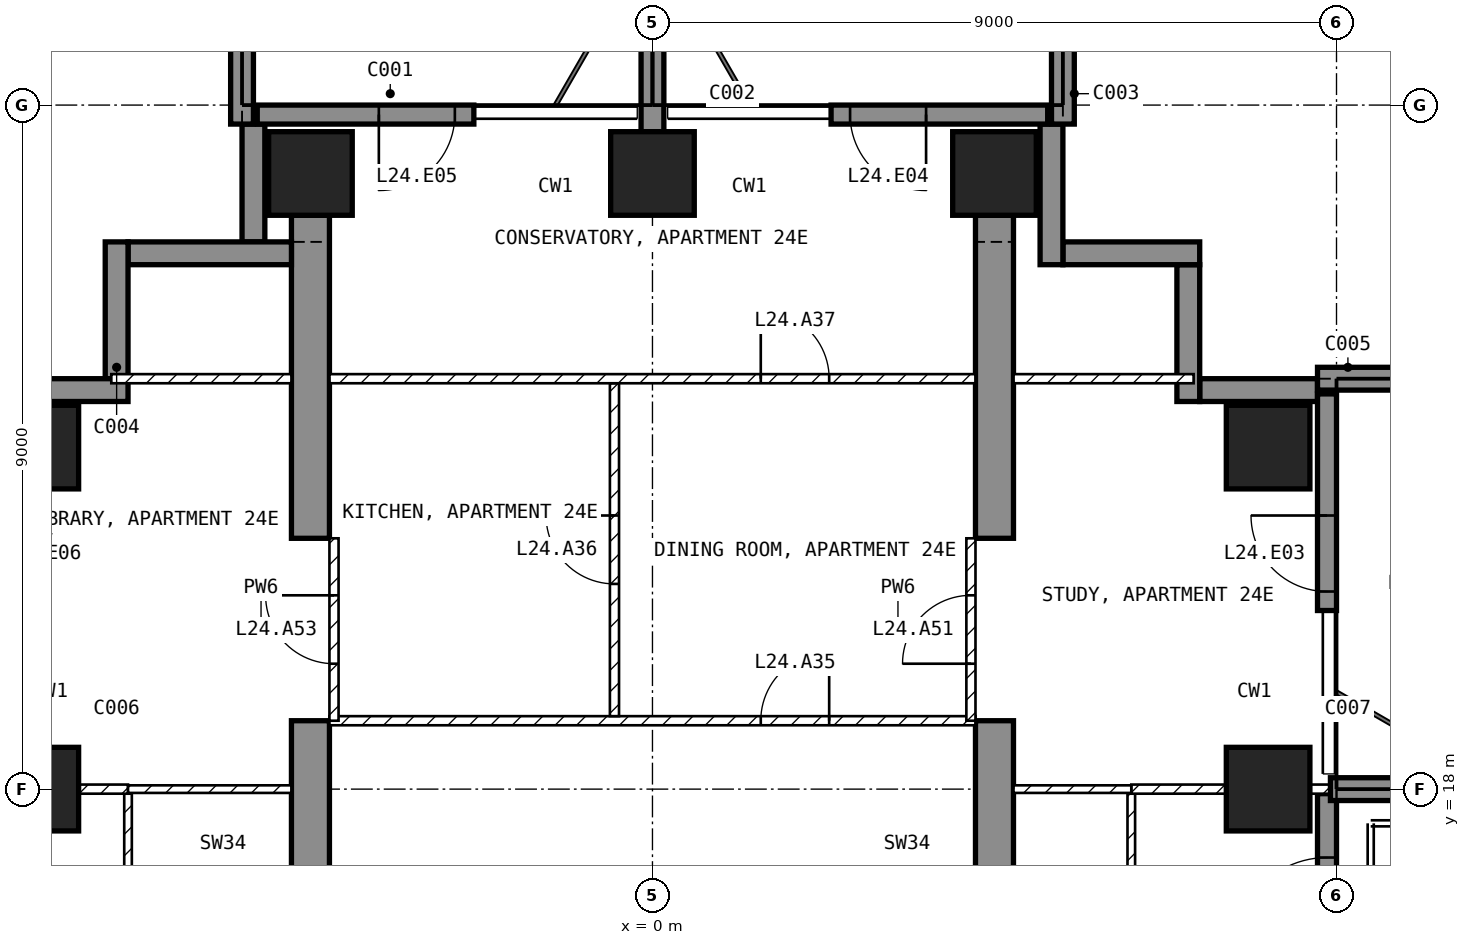
"""IFC4 building model, lengths in metres.
Left out: names, types, materials, properties, quantities, classifications, styles, units other than length and angle.
Written with IfcOpenShell. Run it as: python <this file> out.ifc"""

import sys

from ifc_helpers import new_model, si_unit, direction, frame, frame_2d, origin, origin_2d, place, context, subcontext, project, spatial, polyline, rectangle, outline, extrude, element, fill, save


model = new_model("IFC4")
c1 = context("Model", 3, precision=1e-05, world=origin(), true_north=direction((0.0, 1.0)))
c2 = subcontext(c1, "Body", "Model", "MODEL_VIEW")
j1 = project(units=[si_unit("LENGTHUNIT", "METRE"), si_unit("PLANEANGLEUNIT", "RADIAN")], contexts=[c1])
p1 = place(None, origin())
s1 = spatial("IfcSite", under=j1, at=p1, CompositionType="ELEMENT")
p2 = place(p1, origin())
s2 = spatial("IfcBuilding", under=s1, at=p2, CompositionType="ELEMENT")
p3 = place(p2, frame((0.0, 0.0, 105.9)))
s3 = spatial("IfcBuildingStorey", under=s2, at=p3, CompositionType="ELEMENT", Elevation=105.9)
for number, where, z_axis, x_axis in (
    (1, (-8.1, 18.0, -0.25), (0.0, 0.0, 1.0), (1.0, 0.0, 0.0)),
    (2, (-8.1, 22.5, -0.25), (0.0, 0.0, 1.0), (1.0, 0.0, 0.0)),
    (3, (-4.5, 26.1, -0.25), (0.0, 0.0, 1.0), (1.0, 0.0, 0.0)),
    (4, (0.0, 26.1, -0.25), (0.0, 0.0, 1.0), (1.0, 0.0, 0.0)),
    (5, (4.5, 26.1, -0.25), (0.0, 0.0, 1.0), (1.0, 0.0, 0.0)),
    (6, (8.1, 18.0, -0.25), (0.0, 0.0, 1.0), (1.0, 0.0, 0.0)),
    (7, (8.1, 22.5, -0.25), (0.0, 0.0, 1.0), (1.0, 0.0, 0.0)),
):
    element("IfcColumn", number, at=place(p3, frame(where, z_axis=z_axis, x_axis=x_axis)), inside=s3, PredefinedType="COLUMN", context=c2, shape_type="SweptSolid", body=[
        extrude(rectangle(XDim=1.1, YDim=1.1, at=origin_2d()), origin(), (0.0, 0.0, 1.0), 3.5),
    ])
for number, where, z_axis, x_axis in (
    (8, (-4.75, 9.0, -0.25), (1.0, 0.0, 0.0), (0.0, 1.0, 0.0)),
    (9, (4.25, 9.0, -0.25), (1.0, 0.0, 0.0), (0.0, 1.0, 0.0)),
):
    element("IfcWall", number, at=place(p3, frame(where, z_axis=z_axis, x_axis=x_axis)), inside=s3, PredefinedType="SHEAR", context=c2, shape_type="SweptSolid", body=[
        extrude(outline(polyline([(0.0, 0.0), (2.1, 0.0), (2.1, 2.65), (4.5, 2.65), (4.5, 0.0), (9.9, 0.0), (9.9, 2.65), (12.3, 2.65), (12.3, 0.0), (16.55, 0.0), (16.55, 3.5), (0.0, 3.5), (0.0, 0.0)])), origin(), (0.0, 0.0, 1.0), 0.5),
    ])
p4 = place(p3, frame((8.875, 15.65, 0.0), z_axis=(0.0, 0.0, 1.0), x_axis=(0.0, 1.0, 0.0)))
e10 = element("IfcWall", 10, at=p4, inside=s3, PredefinedType="SOLIDWALL", context=c2, shape_type="SweptSolid", body=[
    extrude(rectangle(XDim=2.29, YDim=0.25, at=frame_2d((1.145, 0.0))), origin(), (0.0, 0.0, 1.0), 3.25),
])
p5 = place(p4, frame((0.25, 0.0, 0.0)))
e11 = element("IfcOpeningElement", 11, at=p5, cuts=e10, PredefinedType="OPENING", context=c2, shape_type="SweptSolid", body=[
    extrude(rectangle(XDim=1.2, YDim=2.4, at=frame_2d((0.6, 1.2))), frame((0.0, 0.135, 0.0), z_axis=(0.0, -1.0, 0.0), x_axis=(1.0, 0.0, 0.0)), (0.0, 0.0, 1.0), 0.27),
])
p6 = place(p3, frame((8.875, 20.35, 0.0), z_axis=(0.0, 0.0, 1.0), x_axis=(0.0, 1.0, 0.0)))
e12 = element("IfcWall", 12, at=p6, inside=s3, PredefinedType="SOLIDWALL", context=c2, shape_type="SweptSolid", body=[
    extrude(rectangle(XDim=2.85, YDim=0.25, at=frame_2d((1.425, 0.0))), origin(), (0.0, 0.0, 1.0), 3.25),
])
p7 = place(p6, frame((0.25, 0.0, 0.0)))
e13 = element("IfcOpeningElement", 13, at=p7, cuts=e12, PredefinedType="OPENING", context=c2, shape_type="SweptSolid", body=[
    extrude(rectangle(XDim=1.0, YDim=2.4, at=frame_2d((0.5, 1.2))), frame((0.0, 0.135, 0.0), z_axis=(0.0, -1.0, 0.0), x_axis=(1.0, 0.0, 0.0)), (0.0, 0.0, 1.0), 0.27),
])
p8 = place(p3, frame((5.2, 26.875, 0.0), z_axis=(0.0, 0.0, 1.0), x_axis=(-1.0, 0.0, 0.0)))
e14 = element("IfcWall", 14, at=p8, inside=s3, PredefinedType="SOLIDWALL", context=c2, shape_type="SweptSolid", body=[
    extrude(rectangle(XDim=2.85, YDim=0.25, at=frame_2d((1.425, 0.0))), origin(), (0.0, 0.0, 1.0), 3.25),
])
p9 = place(p8, frame((1.6, 0.0, 0.0)))
e15 = element("IfcOpeningElement", 15, at=p9, cuts=e14, PredefinedType="OPENING", context=c2, shape_type="SweptSolid", body=[
    extrude(rectangle(XDim=1.0, YDim=2.4, at=frame_2d((0.5, 1.2))), frame((0.0, 0.135, 0.0), z_axis=(0.0, -1.0, 0.0), x_axis=(1.0, 0.0, 0.0)), (0.0, 0.0, 1.0), 0.27),
])
p10 = place(p3, frame((-2.35, 26.875, 0.0), z_axis=(0.0, 0.0, 1.0), x_axis=(-1.0, 0.0, 0.0)))
e16 = element("IfcWall", 16, at=p10, inside=s3, PredefinedType="SOLIDWALL", context=c2, shape_type="SweptSolid", body=[
    extrude(rectangle(XDim=2.85, YDim=0.25, at=frame_2d((1.425, 0.0))), origin(), (0.0, 0.0, 1.0), 3.25),
])
p11 = place(p10, frame((0.25, 0.0, 0.0)))
e17 = element("IfcOpeningElement", 17, at=p11, cuts=e16, PredefinedType="OPENING", context=c2, shape_type="SweptSolid", body=[
    extrude(rectangle(XDim=1.0, YDim=2.4, at=frame_2d((0.5, 1.2))), frame((0.0, 0.135, 0.0), z_axis=(0.0, -1.0, 0.0), x_axis=(1.0, 0.0, 0.0)), (0.0, 0.0, 1.0), 0.27),
])
p12 = place(p3, frame((8.75, 23.25, 0.0), z_axis=(0.0, 0.0, 1.0), x_axis=(-1.0, 0.0, 0.0)))
e18 = element("IfcWall", 18, at=p12, inside=s3, PredefinedType="SOLIDWALL", context=c2, shape_type="SweptSolid", body=[
    extrude(rectangle(XDim=1.55, YDim=0.3, at=frame_2d((0.775, 0.0))), origin(), (0.0, 0.0, 1.0), 3.25),
])
p13 = place(p3, frame((7.05, 23.1, 0.0), z_axis=(0.0, 0.0, 1.0), x_axis=(0.0, 1.0, 0.0)))
e19 = element("IfcWall", 19, at=p13, inside=s3, PredefinedType="SOLIDWALL", context=c2, shape_type="SweptSolid", body=[
    extrude(rectangle(XDim=1.8, YDim=0.3, at=frame_2d((0.9, 0.0))), origin(), (0.0, 0.0, 1.0), 3.25),
])
p14 = place(p3, frame((7.2, 25.05, 0.0), z_axis=(0.0, 0.0, 1.0), x_axis=(-1.0, 0.0, 0.0)))
e20 = element("IfcWall", 20, at=p14, inside=s3, PredefinedType="SOLIDWALL", context=c2, shape_type="SweptSolid", body=[
    extrude(rectangle(XDim=1.8, YDim=0.3, at=frame_2d((0.9, 0.0))), origin(), (0.0, 0.0, 1.0), 3.25),
])
p15 = place(p3, frame((5.25, 24.9, 0.0), z_axis=(0.0, 0.0, 1.0), x_axis=(0.0, 1.0, 0.0)))
e21 = element("IfcWall", 21, at=p15, inside=s3, PredefinedType="SOLIDWALL", context=c2, shape_type="SweptSolid", body=[
    extrude(rectangle(XDim=1.85, YDim=0.3, at=frame_2d((0.925, 0.0))), origin(), (0.0, 0.0, 1.0), 3.25),
])
p16 = place(p3, frame((-5.25, 26.75, 0.0), z_axis=(0.0, 0.0, 1.0), x_axis=(0.0, -1.0, 0.0)))
e22 = element("IfcWall", 22, at=p16, inside=s3, PredefinedType="SOLIDWALL", context=c2, shape_type="SweptSolid", body=[
    extrude(rectangle(XDim=1.55, YDim=0.3, at=frame_2d((0.775, 0.0))), origin(), (0.0, 0.0, 1.0), 3.25),
])
p17 = place(p3, frame((-4.75, 25.05, 0.0), z_axis=(0.0, 0.0, 1.0), x_axis=(-1.0, 0.0, 0.0)))
e23 = element("IfcWall", 23, at=p17, inside=s3, PredefinedType="SOLIDWALL", context=c2, shape_type="SweptSolid", body=[
    extrude(rectangle(XDim=2.15, YDim=0.3, at=frame_2d((1.075, 0.0))), origin(), (0.0, 0.0, 1.0), 3.25),
])
p18 = place(p3, frame((-7.05, 25.2, 0.0), z_axis=(0.0, 0.0, 1.0), x_axis=(0.0, -1.0, 0.0)))
e24 = element("IfcWall", 24, at=p18, inside=s3, PredefinedType="SOLIDWALL", context=c2, shape_type="SweptSolid", body=[
    extrude(rectangle(XDim=1.8, YDim=0.3, at=frame_2d((0.9, 0.0))), origin(), (0.0, 0.0, 1.0), 3.25),
])
p19 = place(p3, frame((-6.9, 23.25, 0.0), z_axis=(0.0, 0.0, 1.0), x_axis=(-1.0, 0.0, 0.0)))
e25 = element("IfcWall", 25, at=p19, inside=s3, PredefinedType="SOLIDWALL", context=c2, shape_type="SweptSolid", body=[
    extrude(rectangle(XDim=1.85, YDim=0.3, at=frame_2d((0.925, 0.0))), origin(), (0.0, 0.0, 1.0), 3.25),
])
p20 = place(p3, frame((-5.4, 26.75, 0.0), z_axis=(0.0, 0.0, 1.0), x_axis=(0.0, 1.0, 0.0)))
e26 = element("IfcWall", 26, at=p20, inside=s3, PredefinedType="SOLIDWALL", context=c2, shape_type="SweptSolid", body=[
    extrude(rectangle(XDim=2.95, YDim=0.3, at=frame_2d((1.475, 0.0))), origin(), (0.0, 0.0, 1.0), 3.25),
])
p21 = place(p3, frame((0.0, 26.65, 0.0), z_axis=(0.0, 0.0, 1.0), x_axis=(0.0, 1.0, 0.0)))
e27 = element("IfcWall", 27, at=p21, inside=s3, PredefinedType="SOLIDWALL", context=c2, shape_type="SweptSolid", body=[
    extrude(rectangle(XDim=3.05, YDim=0.3, at=frame_2d((1.525, 0.0))), origin(), (0.0, 0.0, 1.0), 3.25),
])
p22 = place(p3, frame((5.4, 26.75, 0.0), z_axis=(0.0, 0.0, 1.0), x_axis=(0.0, 1.0, 0.0)))
e28 = element("IfcWall", 28, at=p22, inside=s3, PredefinedType="SOLIDWALL", context=c2, shape_type="SweptSolid", body=[
    extrude(rectangle(XDim=2.95, YDim=0.3, at=frame_2d((1.475, 0.0))), origin(), (0.0, 0.0, 1.0), 3.25),
])
p23 = place(p3, frame((8.92, 18.0, 0.0), z_axis=(0.0, 0.0, 1.0), x_axis=(1.0, 0.0, 0.0)))
e29 = element("IfcWall", 29, at=p23, inside=s3, PredefinedType="SOLIDWALL", context=c2, shape_type="SweptSolid", body=[
    extrude(rectangle(XDim=2.82, YDim=0.3, at=frame_2d((1.41, 0.0))), origin(), (0.0, 0.0, 1.0), 3.25),
])
p24 = place(p3, frame((8.75, 23.4, 0.0), z_axis=(0.0, 0.0, 1.0), x_axis=(1.0, 0.0, 0.0)))
e30 = element("IfcWall", 30, at=p24, inside=s3, PredefinedType="SOLIDWALL", context=c2, shape_type="SweptSolid", body=[
    extrude(rectangle(XDim=2.95, YDim=0.3, at=frame_2d((1.475, 0.0))), origin(), (0.0, 0.0, 1.0), 3.25),
])
p25 = place(p3, frame((-4.25, 18.9, 0.0), z_axis=(0.0, 0.0, 1.0), x_axis=(1.0, 0.0, 0.0)))
e31 = element("IfcWall", 31, at=p25, inside=s3, PredefinedType="PARTITIONING", context=c2, shape_type="SweptSolid", body=[
    extrude(rectangle(XDim=8.5, YDim=0.12, at=frame_2d((4.25, 0.0))), origin(), (0.0, 0.0, 1.0), 3.25),
])
p26 = place(p25, frame((5.675, 0.0, 0.0)))
e32 = element("IfcOpeningElement", 32, at=p26, cuts=e31, PredefinedType="OPENING", context=c2, shape_type="SweptSolid", body=[
    extrude(rectangle(XDim=0.9, YDim=2.1, at=frame_2d((0.45, 1.05))), frame((0.0, 0.07, 0.0), z_axis=(0.0, -1.0, 0.0), x_axis=(1.0, 0.0, 0.0)), (0.0, 0.0, 1.0), 0.14),
])
p27 = place(p3, frame((-0.5, 18.96, 0.0), z_axis=(0.0, 0.0, 1.0), x_axis=(0.0, 1.0, 0.0)))
e33 = element("IfcWall", 33, at=p27, inside=s3, PredefinedType="PARTITIONING", context=c2, shape_type="SweptSolid", body=[
    extrude(rectangle(XDim=4.38, YDim=0.12, at=frame_2d((2.19, 0.0))), origin(), (0.0, 0.0, 1.0), 3.25),
])
p28 = place(p27, frame((1.74, 0.0, 0.0)))
e34 = element("IfcOpeningElement", 34, at=p28, cuts=e33, PredefinedType="OPENING", context=c2, shape_type="SweptSolid", body=[
    extrude(rectangle(XDim=0.9, YDim=2.1, at=frame_2d((0.45, 1.05))), frame((0.0, 0.07, 0.0), z_axis=(0.0, -1.0, 0.0), x_axis=(1.0, 0.0, 0.0)), (0.0, 0.0, 1.0), 0.14),
])
p29 = place(p3, frame((-4.25, 23.4, 0.0), z_axis=(0.0, 0.0, 1.0), x_axis=(1.0, 0.0, 0.0)))
e35 = element("IfcWall", 35, at=p29, inside=s3, PredefinedType="PARTITIONING", context=c2, shape_type="SweptSolid", body=[
    extrude(rectangle(XDim=8.5, YDim=0.12, at=frame_2d((4.25, 0.0))), origin(), (0.0, 0.0, 1.0), 3.25),
])
p30 = place(p29, frame((5.675, 0.0, 0.0)))
e36 = element("IfcOpeningElement", 36, at=p30, cuts=e35, PredefinedType="OPENING", context=c2, shape_type="SweptSolid", body=[
    extrude(rectangle(XDim=0.9, YDim=2.1, at=frame_2d((0.45, 1.05))), frame((0.0, 0.07, 0.0), z_axis=(0.0, -1.0, 0.0), x_axis=(1.0, 0.0, 0.0)), (0.0, 0.0, 1.0), 0.14),
])
p31 = place(p3, frame((6.3, 14.45, 0.0), z_axis=(0.0, 0.0, 1.0), x_axis=(0.0, 1.0, 0.0)))
e37 = element("IfcWall", 37, at=p31, inside=s3, PredefinedType="PARTITIONING", context=c2, shape_type="SweptSolid", body=[
    extrude(rectangle(XDim=3.49, YDim=0.1, at=frame_2d((1.745, 0.0))), origin(), (0.0, 0.0, 1.0), 3.25),
])
p32 = place(p3, frame((6.3, 18.0, 0.0), z_axis=(0.0, 0.0, 1.0), x_axis=(1.0, 0.0, 0.0)))
e38 = element("IfcWall", 38, at=p32, inside=s3, PredefinedType="PARTITIONING", context=c2, shape_type="SweptSolid", body=[
    extrude(rectangle(XDim=2.62, YDim=0.12, at=frame_2d((1.31, 0.0))), origin(), (0.0, 0.0, 1.0), 2.414),
])
p33 = place(p3, frame((4.75, 18.0, 0.0), z_axis=(0.0, 0.0, 1.0), x_axis=(1.0, 0.0, 0.0)))
e39 = element("IfcWall", 39, at=p33, inside=s3, PredefinedType="PARTITIONING", context=c2, shape_type="SweptSolid", body=[
    extrude(rectangle(XDim=1.55, YDim=0.1, at=frame_2d((0.775, 0.0))), origin(), (0.0, 0.0, 1.0), 2.414),
])
p34 = place(p3, frame((4.75, 23.4, 0.0), z_axis=(0.0, 0.0, 1.0), x_axis=(1.0, 0.0, 0.0)))
e40 = element("IfcWall", 40, at=p34, inside=s3, PredefinedType="PARTITIONING", context=c2, shape_type="SweptSolid", body=[
    extrude(rectangle(XDim=2.37, YDim=0.12, at=frame_2d((1.185, 0.0))), origin(), (0.0, 0.0, 1.0), 3.25),
])
p35 = place(p3, frame((-6.9, 17.94, 0.0), z_axis=(0.0, 0.0, 1.0), x_axis=(0.0, -1.0, 0.0)))
e41 = element("IfcWall", 41, at=p35, inside=s3, PredefinedType="PARTITIONING", context=c2, shape_type="SweptSolid", body=[
    extrude(rectangle(XDim=3.49, YDim=0.1, at=frame_2d((1.745, 0.0))), origin(), (0.0, 0.0, 1.0), 3.25),
])
p36 = place(p35, frame((1.52, 0.0, 0.0)))
e42 = element("IfcOpeningElement", 42, at=p36, cuts=e41, PredefinedType="OPENING", context=c2, shape_type="SweptSolid", body=[
    extrude(rectangle(XDim=0.85, YDim=2.1, at=frame_2d((0.425, 1.05))), frame((0.0, 0.06, 0.0), z_axis=(0.0, -1.0, 0.0), x_axis=(1.0, 0.0, 0.0)), (0.0, 0.0, 1.0), 0.12),
])
p37 = place(p3, frame((-8.92, 18.0, 0.0), z_axis=(0.0, 0.0, 1.0), x_axis=(1.0, 0.0, 0.0)))
e43 = element("IfcWall", 43, at=p37, inside=s3, PredefinedType="PARTITIONING", context=c2, shape_type="SweptSolid", body=[
    extrude(rectangle(XDim=2.02, YDim=0.12, at=frame_2d((1.01, 0.0))), origin(), (0.0, 0.0, 1.0), 2.414),
])
p38 = place(p3, frame((-6.9, 18.0, 0.0), z_axis=(0.0, 0.0, 1.0), x_axis=(1.0, 0.0, 0.0)))
e44 = element("IfcWall", 44, at=p38, inside=s3, PredefinedType="PARTITIONING", context=c2, shape_type="SweptSolid", body=[
    extrude(rectangle(XDim=2.15, YDim=0.1, at=frame_2d((1.075, 0.0))), origin(), (0.0, 0.0, 1.0), 2.414),
])
p39 = place(p3, frame((-7.12, 23.4, 0.0), z_axis=(0.0, 0.0, 1.0), x_axis=(1.0, 0.0, 0.0)))
e45 = element("IfcWall", 45, at=p39, inside=s3, PredefinedType="PARTITIONING", context=c2, shape_type="SweptSolid", body=[
    extrude(rectangle(XDim=2.37, YDim=0.12, at=frame_2d((1.185, 0.0))), origin(), (0.0, 0.0, 1.0), 3.25),
])
p40 = place(p3, frame((4.19, 18.9, 0.0), z_axis=(0.0, 0.0, 1.0), x_axis=(0.0, 1.0, 0.0)))
e46 = element("IfcWall", 46, at=p40, inside=s3, PredefinedType="PARTITIONING", context=c2, shape_type="SweptSolid", body=[
    extrude(rectangle(XDim=2.4, YDim=0.12, at=frame_2d((1.2, 0.0))), origin(), (0.0, 0.0, 1.0), 2.4),
])
p41 = place(p40, frame((0.75, 0.0, 0.0)))
e47 = element("IfcOpeningElement", 47, at=p41, cuts=e46, PredefinedType="OPENING", context=c2, shape_type="SweptSolid", body=[
    extrude(rectangle(XDim=0.9, YDim=2.1, at=frame_2d((0.45, 1.05))), frame((0.0, 0.07, 0.0), z_axis=(0.0, -1.0, 0.0), x_axis=(1.0, 0.0, 0.0)), (0.0, 0.0, 1.0), 0.14),
])
p42 = place(p3, frame((-4.19, 18.9, 0.0), z_axis=(0.0, 0.0, 1.0), x_axis=(0.0, 1.0, 0.0)))
e48 = element("IfcWall", 48, at=p42, inside=s3, PredefinedType="PARTITIONING", context=c2, shape_type="SweptSolid", body=[
    extrude(rectangle(XDim=2.4, YDim=0.12, at=frame_2d((1.2, 0.0))), origin(), (0.0, 0.0, 1.0), 2.4),
])
p43 = place(p42, frame((0.75, 0.0, 0.0)))
e49 = element("IfcOpeningElement", 49, at=p43, cuts=e48, PredefinedType="OPENING", context=c2, shape_type="SweptSolid", body=[
    extrude(rectangle(XDim=0.9, YDim=2.1, at=frame_2d((0.45, 1.05))), frame((0.0, 0.07, 0.0), z_axis=(0.0, -1.0, 0.0), x_axis=(1.0, 0.0, 0.0)), (0.0, 0.0, 1.0), 0.14),
])
p44 = place(p5, origin())
e50 = element("IfcDoor", 50, at=p44, inside=s3, OperationType="SINGLE_SWING_LEFT", PredefinedType="DOOR", context=c2, shape_type="SweptSolid", body=[
    extrude(rectangle(XDim=1.2, YDim=2.4, at=frame_2d((0.6, 1.2))), frame((0.0, 0.025, 0.0), z_axis=(0.0, -1.0, 0.0), x_axis=(1.0, 0.0, 0.0)), (0.0, 0.0, 1.0), 0.05),
])
fill(e11, e50)
p45 = place(p7, origin())
e51 = element("IfcDoor", 51, at=p45, inside=s3, OperationType="SINGLE_SWING_RIGHT", PredefinedType="DOOR", context=c2, shape_type="SweptSolid", body=[
    extrude(rectangle(XDim=1.0, YDim=2.4, at=frame_2d((0.5, 1.2))), frame((0.0, 0.025, 0.0), z_axis=(0.0, -1.0, 0.0), x_axis=(1.0, 0.0, 0.0)), (0.0, 0.0, 1.0), 0.05),
])
fill(e13, e51)
p46 = place(p9, origin())
e52 = element("IfcDoor", 52, at=p46, inside=s3, OperationType="SINGLE_SWING_LEFT", PredefinedType="DOOR", context=c2, shape_type="SweptSolid", body=[
    extrude(rectangle(XDim=1.0, YDim=2.4, at=frame_2d((0.5, 1.2))), frame((0.0, 0.025, 0.0), z_axis=(0.0, -1.0, 0.0), x_axis=(1.0, 0.0, 0.0)), (0.0, 0.0, 1.0), 0.05),
])
fill(e15, e52)
p47 = place(p11, origin())
e53 = element("IfcDoor", 53, at=p47, inside=s3, OperationType="SINGLE_SWING_RIGHT", PredefinedType="DOOR", context=c2, shape_type="SweptSolid", body=[
    extrude(rectangle(XDim=1.0, YDim=2.4, at=frame_2d((0.5, 1.2))), frame((0.0, 0.025, 0.0), z_axis=(0.0, -1.0, 0.0), x_axis=(1.0, 0.0, 0.0)), (0.0, 0.0, 1.0), 0.05),
])
fill(e17, e53)
p48 = place(p26, origin())
e54 = element("IfcDoor", 54, at=p48, inside=s3, OperationType="SINGLE_SWING_RIGHT", PredefinedType="DOOR", context=c2, shape_type="SweptSolid", body=[
    extrude(rectangle(XDim=0.9, YDim=2.1, at=frame_2d((0.45, 1.05))), frame((0.0, 0.025, 0.0), z_axis=(0.0, -1.0, 0.0), x_axis=(1.0, 0.0, 0.0)), (0.0, 0.0, 1.0), 0.05),
])
fill(e32, e54)
p49 = place(p28, origin())
e55 = element("IfcDoor", 55, at=p49, inside=s3, OperationType="SINGLE_SWING_RIGHT", PredefinedType="DOOR", context=c2, shape_type="SweptSolid", body=[
    extrude(rectangle(XDim=0.9, YDim=2.1, at=frame_2d((0.45, 1.05))), frame((0.0, 0.025, 0.0), z_axis=(0.0, -1.0, 0.0), x_axis=(1.0, 0.0, 0.0)), (0.0, 0.0, 1.0), 0.05),
])
fill(e34, e55)
p50 = place(p30, origin())
e56 = element("IfcDoor", 56, at=p50, inside=s3, OperationType="SINGLE_SWING_LEFT", PredefinedType="DOOR", context=c2, shape_type="SweptSolid", body=[
    extrude(rectangle(XDim=0.9, YDim=2.1, at=frame_2d((0.45, 1.05))), frame((0.0, 0.025, 0.0), z_axis=(0.0, -1.0, 0.0), x_axis=(1.0, 0.0, 0.0)), (0.0, 0.0, 1.0), 0.05),
])
fill(e36, e56)
p51 = place(p41, origin())
e57 = element("IfcDoor", 57, at=p51, inside=s3, OperationType="SINGLE_SWING_LEFT", PredefinedType="DOOR", context=c2, shape_type="SweptSolid", body=[
    extrude(rectangle(XDim=0.9, YDim=2.1, at=frame_2d((0.45, 1.05))), frame((0.0, 0.025, 0.0), z_axis=(0.0, -1.0, 0.0), x_axis=(1.0, 0.0, 0.0)), (0.0, 0.0, 1.0), 0.05),
])
fill(e47, e57)
p52 = place(p43, origin())
e58 = element("IfcDoor", 58, at=p52, inside=s3, OperationType="SINGLE_SWING_RIGHT", PredefinedType="DOOR", context=c2, shape_type="SweptSolid", body=[
    extrude(rectangle(XDim=0.9, YDim=2.1, at=frame_2d((0.45, 1.05))), frame((0.0, 0.025, 0.0), z_axis=(0.0, -1.0, 0.0), x_axis=(1.0, 0.0, 0.0)), (0.0, 0.0, 1.0), 0.05),
])
fill(e49, e58)
save(model, sys.argv[1])
